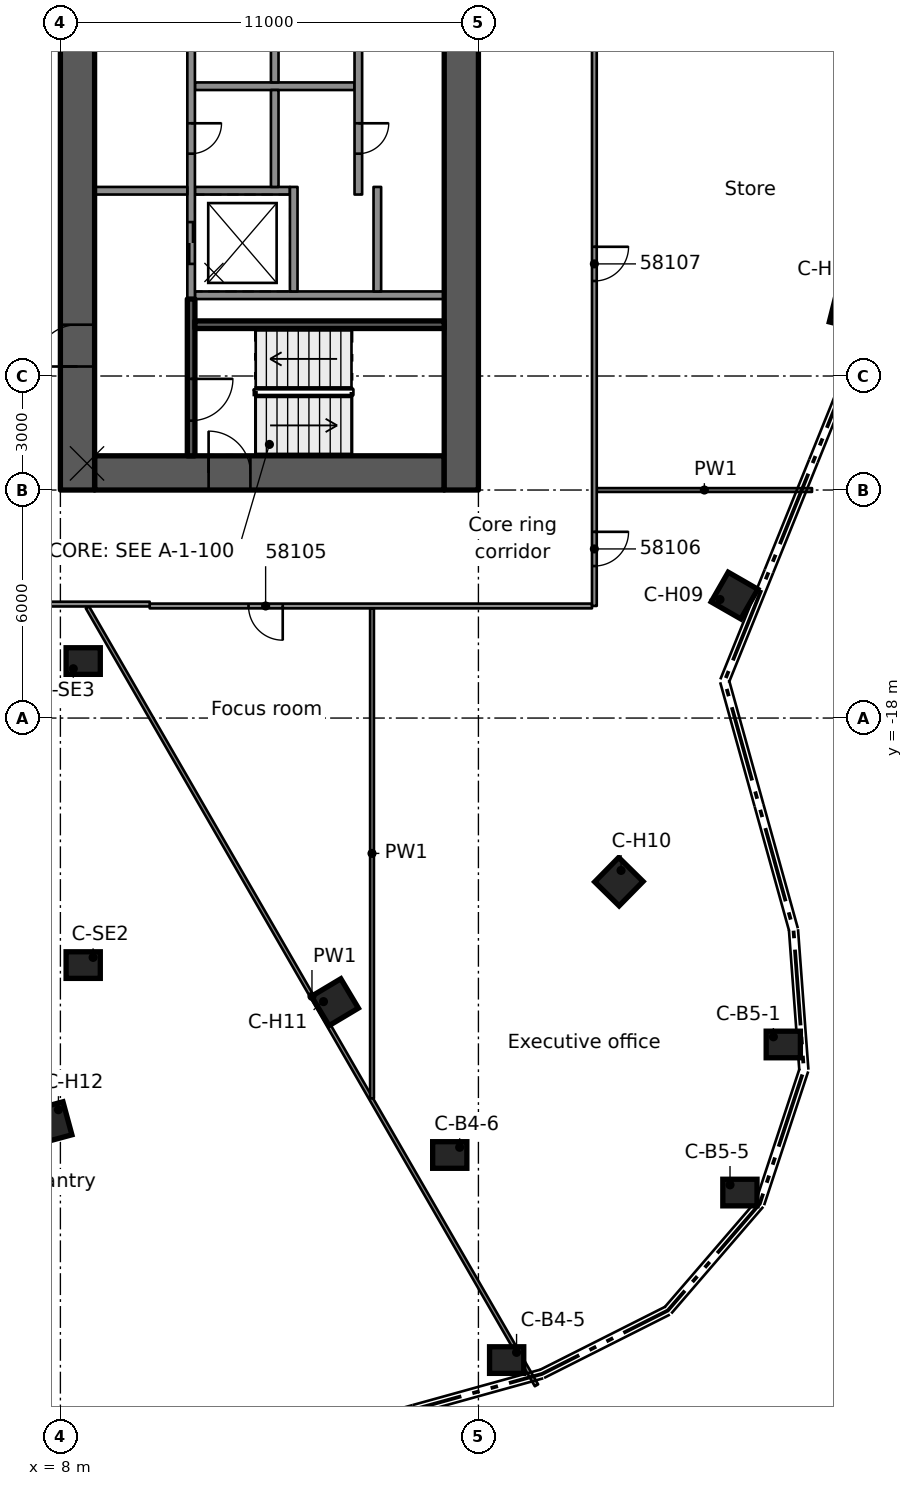
"""IFC4 building model, lengths in metres.
Left out: names, types, materials, properties, quantities, classifications, styles, units other than length and angle.
Written with IfcOpenShell. Run it as: python <this file> out.ifc"""

import sys

from ifc_helpers import new_model, si_unit, direction, frame, frame_2d, origin, origin_2d, place, context, subcontext, project, spatial, rectangle, extrude, element, fill, save


model = new_model("IFC4")
c1 = context("Model", 3, precision=1e-05, world=origin(), true_north=direction((0.0, 1.0)))
c2 = subcontext(c1, "Body", "Model", "MODEL_VIEW")
j1 = project(units=[si_unit("LENGTHUNIT", "METRE"), si_unit("PLANEANGLEUNIT", "RADIAN")], contexts=[c1])
p1 = place(None, origin())
s1 = spatial("IfcSite", under=j1, at=p1, CompositionType="ELEMENT")
p2 = place(p1, origin())
s2 = spatial("IfcBuilding", under=s1, at=p2, CompositionType="ELEMENT")
p3 = place(p2, frame((0.0, 0.0, 285.9)))
s3 = spatial("IfcBuildingStorey", under=s2, at=p3, CompositionType="ELEMENT", Elevation=285.9)
p4 = place(p3, frame((8.9, -11.55, 0.0), z_axis=(0.0, 0.0, 1.0), x_axis=(1.0, 0.0, 0.0)))
e1 = element("IfcWall", 1, at=p4, inside=s3, PredefinedType="SHEAR", context=c2, shape_type="SweptSolid", body=[
    extrude(rectangle(XDim=9.2, YDim=0.9, at=frame_2d((4.6, 0.0))), origin(), (0.0, 0.0, 1.0), 3.5),
])
p5 = place(p4, frame((3.0, 0.0, 0.0)))
e2 = element("IfcOpeningElement", 2, at=p5, cuts=e1, PredefinedType="OPENING", context=c2, shape_type="SweptSolid", body=[
    extrude(rectangle(XDim=1.1, YDim=2.1, at=frame_2d((0.55, 1.05))), frame((0.0, 0.46, 0.0), z_axis=(0.0, -1.0, 0.0), x_axis=(1.0, 0.0, 0.0)), (0.0, 0.0, 1.0), 0.92),
])
p6 = place(p3, frame((8.45, -12.0, 0.0), z_axis=(0.0, 0.0, 1.0), x_axis=(0.0, 1.0, 0.0)))
e3 = element("IfcWall", 3, at=p6, inside=s3, PredefinedType="SHEAR", context=c2, shape_type="SweptSolid", body=[
    extrude(rectangle(XDim=24.0, YDim=0.9, at=frame_2d((12.0, 0.0))), origin(), (0.0, 0.0, 1.0), 3.5),
])
p7 = place(p6, frame((12.6, 0.0, 0.0)))
e4 = element("IfcOpeningElement", 4, at=p7, cuts=e3, PredefinedType="OPENING", context=c2, shape_type="SweptSolid", body=[
    extrude(rectangle(XDim=1.8, YDim=2.1, at=frame_2d((0.9, 1.05))), frame((0.0, 0.46, 0.0), z_axis=(0.0, -1.0, 0.0), x_axis=(1.0, 0.0, 0.0)), (0.0, 0.0, 1.0), 0.92),
])
p8 = place(p6, frame((3.25, 0.0, 0.0)))
e5 = element("IfcOpeningElement", 5, at=p8, cuts=e3, PredefinedType="OPENING", context=c2, shape_type="SweptSolid", body=[
    extrude(rectangle(XDim=1.1, YDim=2.1, at=frame_2d((0.55, 1.05))), frame((0.0, 0.46, 0.0), z_axis=(0.0, -1.0, 0.0), x_axis=(1.0, 0.0, 0.0)), (0.0, 0.0, 1.0), 0.92),
])
p9 = place(p3, frame((18.55, -12.0, 0.0), z_axis=(0.0, 0.0, 1.0), x_axis=(0.0, 1.0, 0.0)))
e6 = element("IfcWall", 6, at=p9, inside=s3, PredefinedType="SHEAR", context=c2, shape_type="SweptSolid", body=[
    extrude(rectangle(XDim=24.0, YDim=0.9, at=frame_2d((12.0, 0.0))), origin(), (0.0, 0.0, 1.0), 3.5),
])
p10 = place(p9, frame((12.1, 0.0, 0.0)))
e7 = element("IfcOpeningElement", 7, at=p10, cuts=e6, PredefinedType="OPENING", context=c2, shape_type="SweptSolid", body=[
    extrude(rectangle(XDim=1.8, YDim=2.1, at=frame_2d((0.9, 1.05))), frame((0.0, 0.46, 0.0), z_axis=(0.0, -1.0, 0.0), x_axis=(1.0, 0.0, 0.0)), (0.0, 0.0, 1.0), 0.92),
])
for number, where, z_axis, x_axis in (
    (8, (19.743, -34.893, 0.0), (0.0, 0.0, 1.0), (1.0, 0.0, 0.0)),
    (9, (18.246, -29.497, 0.0), (0.0, 0.0, 1.0), (1.0, 0.0, 0.0)),
    (10, (27.022, -26.589, 0.0), (0.0, 0.0, 1.0), (1.0, 0.0, 0.0)),
    (11, (25.881, -30.485, 0.0), (0.0, 0.0, 1.0), (1.0, 0.0, 0.0)),
):
    element("IfcColumn", number, at=place(p3, frame(where, z_axis=z_axis, x_axis=x_axis)), inside=s3, PredefinedType="COLUMN", context=c2, shape_type="SweptSolid", body=[
        extrude(rectangle(XDim=0.9, YDim=0.7, at=origin_2d()), origin(), (0.0, 0.0, 1.0), 3.5),
    ])
for number, where, z_axis, x_axis in (
    (12, (28.78, -7.25, 0.0), (0.0, 0.0, 1.0), (0.97, -0.244, 0.0)),
    (13, (25.739, -14.777, 0.0), (0.0, 0.0, 1.0), (0.867, -0.498, 0.0)),
    (14, (22.697, -22.305, 0.0), (0.0, 0.0, 1.0), (0.713, -0.701, 0.0)),
    (15, (15.224, -25.477, 0.0), (0.0, 0.0, 1.0), (0.513, -0.858, 0.0)),
    (16, (7.751, -28.649, 0.0), (0.0, 0.0, 1.0), (0.261, -0.965, 0.0)),
):
    element("IfcColumn", number, at=place(p3, frame(where, z_axis=z_axis, x_axis=x_axis)), inside=s3, PredefinedType="COLUMN", context=c2, shape_type="SweptSolid", body=[
        extrude(rectangle(XDim=0.9, YDim=0.9, at=origin_2d()), origin(), (0.0, 0.0, 1.0), 3.5),
    ])
for number, where, z_axis, x_axis in (
    (17, (8.6, -24.5, 0.0), (0.0, 0.0, 1.0), (1.0, 0.0, 0.0)),
    (18, (8.6, -16.5, 0.0), (0.0, 0.0, 1.0), (1.0, 0.0, 0.0)),
):
    element("IfcColumn", number, at=place(p3, frame(where, z_axis=z_axis, x_axis=x_axis)), inside=s3, PredefinedType="COLUMN", context=c2, shape_type="SweptSolid", body=[
        extrude(rectangle(XDim=0.9, YDim=0.7, at=origin_2d()), origin(), (0.0, 0.0, 1.0), 3.5),
    ])
p11 = place(p3, frame((11.54, -6.875, 0.0), z_axis=(0.0, 0.0, 1.0), x_axis=(1.0, 0.0, 0.0)))
e19 = element("IfcWall", 19, at=p11, inside=s3, PredefinedType="SOLIDWALL", context=c2, shape_type="SweptSolid", body=[
    extrude(rectangle(XDim=6.56, YDim=0.2, at=frame_2d((3.28, 0.0))), origin(), (0.0, 0.0, 1.0), 3.09),
])
p12 = place(p3, frame((11.54, -1.375, 0.0), z_axis=(0.0, 0.0, 1.0), x_axis=(1.0, 0.0, 0.0)))
e20 = element("IfcWall", 20, at=p12, inside=s3, PredefinedType="SOLIDWALL", context=c2, shape_type="SweptSolid", body=[
    extrude(rectangle(XDim=4.2, YDim=0.2, at=frame_2d((2.1, 0.0))), origin(), (0.0, 0.0, 1.0), 3.09),
])
p13 = place(p3, frame((11.54, -4.125, 0.0), z_axis=(0.0, 0.0, 1.0), x_axis=(1.0, 0.0, 0.0)))
e21 = element("IfcWall", 21, at=p13, inside=s3, PredefinedType="SOLIDWALL", context=c2, shape_type="SweptSolid", body=[
    extrude(rectangle(XDim=2.5, YDim=0.2, at=frame_2d((1.25, 0.0))), origin(), (0.0, 0.0, 1.0), 3.09),
])
p14 = place(p3, frame((11.44, 6.975, 0.0), z_axis=(0.0, 0.0, 1.0), x_axis=(0.0, -1.0, 0.0)))
e22 = element("IfcWall", 22, at=p14, inside=s3, PredefinedType="SOLIDWALL", context=c2, shape_type="SweptSolid", body=[
    extrude(rectangle(XDim=13.95, YDim=0.2, at=frame_2d((6.975, 0.0))), origin(), (0.0, 0.0, 1.0), 3.09),
])
p15 = place(p14, frame((0.925, 0.0, 0.0)))
e23 = element("IfcOpeningElement", 23, at=p15, cuts=e22, PredefinedType="OPENING", context=c2, shape_type="SweptSolid", body=[
    extrude(rectangle(XDim=1.1, YDim=2.1, at=frame_2d((0.55, 1.05))), frame((0.0, 0.11, 0.0), z_axis=(0.0, -1.0, 0.0), x_axis=(1.0, 0.0, 0.0)), (0.0, 0.0, 1.0), 0.22),
])
p16 = place(p14, frame((3.675, 0.0, 0.0)))
e24 = element("IfcOpeningElement", 24, at=p16, cuts=e22, PredefinedType="OPENING", context=c2, shape_type="SweptSolid", body=[
    extrude(rectangle(XDim=1.1, YDim=2.1, at=frame_2d((0.55, 1.05))), frame((0.0, 0.11, 0.0), z_axis=(0.0, -1.0, 0.0), x_axis=(1.0, 0.0, 0.0)), (0.0, 0.0, 1.0), 0.22),
])
p17 = place(p14, frame((11.925, 0.0, 0.0)))
e25 = element("IfcOpeningElement", 25, at=p17, cuts=e22, PredefinedType="OPENING", context=c2, shape_type="SweptSolid", body=[
    extrude(rectangle(XDim=1.1, YDim=2.1, at=frame_2d((0.55, 1.05))), frame((0.0, 0.11, 0.0), z_axis=(0.0, -1.0, 0.0), x_axis=(1.0, 0.0, 0.0)), (0.0, 0.0, 1.0), 0.22),
])
p18 = place(p14, frame((6.575, 0.0, 0.0)))
e26 = element("IfcOpeningElement", 26, at=p18, cuts=e22, PredefinedType="OPENING", context=c2, shape_type="SweptSolid", body=[
    extrude(rectangle(XDim=0.8, YDim=2.1, at=frame_2d((0.4, 1.05))), frame((0.0, 0.11, 0.0), z_axis=(0.0, -1.0, 0.0), x_axis=(1.0, 0.0, 0.0)), (0.0, 0.0, 1.0), 0.22),
])
p19 = place(p14, frame((9.325, 0.0, 0.0)))
e27 = element("IfcOpeningElement", 27, at=p19, cuts=e22, PredefinedType="OPENING", context=c2, shape_type="SweptSolid", body=[
    extrude(rectangle(XDim=0.8, YDim=2.1, at=frame_2d((0.4, 1.05))), frame((0.0, 0.11, 0.0), z_axis=(0.0, -1.0, 0.0), x_axis=(1.0, 0.0, 0.0)), (0.0, 0.0, 1.0), 0.22),
])
p20 = place(p3, frame((13.64, 4.025, 0.0), z_axis=(0.0, 0.0, 1.0), x_axis=(0.0, -1.0, 0.0)))
e28 = element("IfcWall", 28, at=p20, inside=s3, PredefinedType="SOLIDWALL", context=c2, shape_type="SweptSolid", body=[
    extrude(rectangle(XDim=5.3, YDim=0.2, at=frame_2d((2.65, 0.0))), origin(), (0.0, 0.0, 1.0), 3.09),
])
p21 = place(p3, frame((13.64, -1.475, 0.0), z_axis=(0.0, 0.0, 1.0), x_axis=(0.0, -1.0, 0.0)))
e29 = element("IfcWall", 29, at=p21, inside=s3, PredefinedType="SOLIDWALL", context=c2, shape_type="SweptSolid", body=[
    extrude(rectangle(XDim=2.55, YDim=0.2, at=frame_2d((1.275, 0.0))), origin(), (0.0, 0.0, 1.0), 3.09),
])
p22 = place(p3, frame((14.14, -4.025, 0.0), z_axis=(0.0, 0.0, 1.0), x_axis=(0.0, -1.0, 0.0)))
e30 = element("IfcWall", 30, at=p22, inside=s3, PredefinedType="SOLIDWALL", context=c2, shape_type="SweptSolid", body=[
    extrude(rectangle(XDim=2.75, YDim=0.2, at=frame_2d((1.375, 0.0))), origin(), (0.0, 0.0, 1.0), 3.09),
])
p23 = place(p3, frame((15.84, 4.025, 0.0), z_axis=(0.0, 0.0, 1.0), x_axis=(0.0, -1.0, 0.0)))
e31 = element("IfcWall", 31, at=p23, inside=s3, PredefinedType="SOLIDWALL", context=c2, shape_type="SweptSolid", body=[
    extrude(rectangle(XDim=8.25, YDim=0.2, at=frame_2d((4.125, 0.0))), origin(), (0.0, 0.0, 1.0), 3.09),
])
p24 = place(p23, frame((0.875, 0.0, 0.0)))
e32 = element("IfcOpeningElement", 32, at=p24, cuts=e31, PredefinedType="OPENING", context=c2, shape_type="SweptSolid", body=[
    extrude(rectangle(XDim=0.8, YDim=2.1, at=frame_2d((0.4, 1.05))), frame((0.0, 0.11, 0.0), z_axis=(0.0, -1.0, 0.0), x_axis=(1.0, 0.0, 0.0)), (0.0, 0.0, 1.0), 0.22),
])
p25 = place(p23, frame((6.375, 0.0, 0.0)))
e33 = element("IfcOpeningElement", 33, at=p25, cuts=e31, PredefinedType="OPENING", context=c2, shape_type="SweptSolid", body=[
    extrude(rectangle(XDim=0.8, YDim=2.1, at=frame_2d((0.4, 1.05))), frame((0.0, 0.11, 0.0), z_axis=(0.0, -1.0, 0.0), x_axis=(1.0, 0.0, 0.0)), (0.0, 0.0, 1.0), 0.22),
])
p26 = place(p3, frame((16.34, -4.025, 0.0), z_axis=(0.0, 0.0, 1.0), x_axis=(0.0, -1.0, 0.0)))
e34 = element("IfcWall", 34, at=p26, inside=s3, PredefinedType="SOLIDWALL", context=c2, shape_type="SweptSolid", body=[
    extrude(rectangle(XDim=2.75, YDim=0.2, at=frame_2d((1.375, 0.0))), origin(), (0.0, 0.0, 1.0), 3.09),
])
p27 = place(p3, frame((11.44, -6.975, 0.0), z_axis=(0.0, 0.0, 1.0), x_axis=(0.0, -1.0, 0.0)))
e35 = element("IfcWall", 35, at=p27, inside=s3, PredefinedType="SOLIDWALL", context=c2, shape_type="SweptSolid", body=[
    extrude(rectangle(XDim=4.125, YDim=0.2, at=frame_2d((2.062, 0.0))), origin(), (0.0, 0.0, 1.0), 3.09),
])
p28 = place(p27, frame((2.1, 0.0, 0.0)))
e36 = element("IfcOpeningElement", 36, at=p28, cuts=e35, PredefinedType="OPENING", context=c2, shape_type="SweptSolid", body=[
    extrude(rectangle(XDim=1.1, YDim=2.1, at=frame_2d((0.55, 1.05))), frame((0.0, 0.11, 0.0), z_axis=(0.0, -1.0, 0.0), x_axis=(1.0, 0.0, 0.0)), (0.0, 0.0, 1.0), 0.22),
])
p29 = place(p3, frame((11.54, -7.65, 0.0), z_axis=(0.0, 0.0, 1.0), x_axis=(1.0, 0.0, 0.0)))
e37 = element("IfcWall", 37, at=p29, inside=s3, PredefinedType="SOLIDWALL", context=c2, shape_type="SweptSolid", body=[
    extrude(rectangle(XDim=6.56, YDim=0.2, at=frame_2d((3.28, 0.0))), origin(), (0.0, 0.0, 1.0), 3.09),
])
p30 = place(p3, frame((8.9, -4.125, 0.0), z_axis=(0.0, 0.0, 1.0), x_axis=(1.0, 0.0, 0.0)))
e38 = element("IfcWall", 38, at=p30, inside=s3, PredefinedType="PARTITIONING", context=c2, shape_type="SweptSolid", body=[
    extrude(rectangle(XDim=2.44, YDim=0.2, at=frame_2d((1.22, 0.0))), origin(), (0.0, 0.0, 1.0), 3.09),
])
p31 = place(p3, frame((8.712, -15.088, 0.0), z_axis=(0.0, 0.0, 1.0), x_axis=(0.499948681642, -0.866055030425, 0.0)))
e39 = element("IfcWall", 39, at=p31, inside=s3, PredefinedType="PARTITIONING", context=c2, shape_type="SweptSolid", body=[
    extrude(rectangle(XDim=23.635, YDim=0.1, at=frame_2d((11.817, 0.0))), origin(), (0.0, 0.0, 1.0), 3.08),
])
p32 = place(p3, frame((21.988, -15.051, 0.0), z_axis=(0.0, 0.0, 1.0), x_axis=(-1.0, 0.0, 0.0)))
e40 = element("IfcWall", 40, at=p32, inside=s3, PredefinedType="PARTITIONING", context=c2, shape_type="SweptSolid", body=[
    extrude(rectangle(XDim=11.638, YDim=0.125, at=frame_2d((5.819, 0.0))), origin(), (0.0, 0.0, 1.0), 3.08),
])
p33 = place(p32, frame((8.137, 0.0, 0.0)))
e41 = element("IfcOpeningElement", 41, at=p33, cuts=e40, PredefinedType="OPENING", context=c2, shape_type="SweptSolid", body=[
    extrude(rectangle(XDim=0.9, YDim=2.1, at=frame_2d((0.45, 1.05))), frame((0.0, 0.073, 0.0), z_axis=(0.0, -1.0, 0.0), x_axis=(1.0, 0.0, 0.0)), (0.0, 0.0, 1.0), 0.145),
])
p34 = place(p3, frame((10.349, -15.001, 0.0), z_axis=(0.0, 0.0, 1.0), x_axis=(-1.0, 0.0, 0.0)))
e42 = element("IfcWall", 42, at=p34, inside=s3, PredefinedType="PARTITIONING", context=c2, shape_type="SweptSolid", body=[
    extrude(rectangle(XDim=21.339, YDim=0.125, at=frame_2d((10.669, 0.0))), origin(), (0.0, 0.0, 1.0), 3.08),
])
p35 = place(p34, frame((14.199, 0.0, 0.0)))
e43 = element("IfcOpeningElement", 43, at=p35, cuts=e42, PredefinedType="OPENING", context=c2, shape_type="SweptSolid", body=[
    extrude(rectangle(XDim=0.9, YDim=2.1, at=frame_2d((0.45, 1.05))), frame((0.0, 0.073, 0.0), z_axis=(0.0, -1.0, 0.0), x_axis=(1.0, 0.0, 0.0)), (0.0, 0.0, 1.0), 0.145),
])
p36 = place(p34, frame((5.538, 0.0, 0.0)))
e44 = element("IfcOpeningElement", 44, at=p36, cuts=e42, PredefinedType="OPENING", context=c2, shape_type="SweptSolid", body=[
    extrude(rectangle(XDim=0.9, YDim=2.1, at=frame_2d((0.45, 1.05))), frame((0.0, 0.073, 0.0), z_axis=(0.0, -1.0, 0.0), x_axis=(1.0, 0.0, 0.0)), (0.0, 0.0, 1.0), 0.145),
])
p37 = place(p3, frame((22.113, -12.0, 0.0), z_axis=(0.0, 0.0, 1.0), x_axis=(1.0, 0.0, 0.0)))
e45 = element("IfcWall", 45, at=p37, inside=s3, PredefinedType="PARTITIONING", context=c2, shape_type="SweptSolid", body=[
    extrude(rectangle(XDim=5.665, YDim=0.1, at=frame_2d((2.833, 0.0))), origin(), (0.0, 0.0, 1.0), 3.08),
])
p38 = place(p3, frame((22.051, 15.05, 0.0), z_axis=(0.0, 0.0, 1.0), x_axis=(0.0, -1.0, 0.0)))
e46 = element("IfcWall", 46, at=p38, inside=s3, PredefinedType="PARTITIONING", context=c2, shape_type="SweptSolid", body=[
    extrude(rectangle(XDim=30.1, YDim=0.125, at=frame_2d((15.05, 0.0))), origin(), (0.0, 0.0, 1.0), 3.08),
])
p39 = place(p38, frame((28.15, 0.0, 0.0)))
e47 = element("IfcOpeningElement", 47, at=p39, cuts=e46, PredefinedType="OPENING", context=c2, shape_type="SweptSolid", body=[
    extrude(rectangle(XDim=0.9, YDim=2.1, at=frame_2d((0.45, 1.05))), frame((0.0, 0.073, 0.0), z_axis=(0.0, -1.0, 0.0), x_axis=(1.0, 0.0, 0.0)), (0.0, 0.0, 1.0), 0.145),
])
p40 = place(p38, frame((20.65, 0.0, 0.0)))
e48 = element("IfcOpeningElement", 48, at=p40, cuts=e46, PredefinedType="OPENING", context=c2, shape_type="SweptSolid", body=[
    extrude(rectangle(XDim=0.9, YDim=2.1, at=frame_2d((0.45, 1.05))), frame((0.0, 0.073, 0.0), z_axis=(0.0, -1.0, 0.0), x_axis=(1.0, 0.0, 0.0)), (0.0, 0.0, 1.0), 0.145),
])
p41 = place(p38, frame((11.4, 0.0, 0.0)))
e49 = element("IfcOpeningElement", 49, at=p41, cuts=e46, PredefinedType="OPENING", context=c2, shape_type="SweptSolid", body=[
    extrude(rectangle(XDim=1.1, YDim=2.1, at=frame_2d((0.55, 1.05))), frame((0.0, 0.073, 0.0), z_axis=(0.0, -1.0, 0.0), x_axis=(1.0, 0.0, 0.0)), (0.0, 0.0, 1.0), 0.145),
])
p42 = place(p38, frame((5.15, 0.0, 0.0)))
e50 = element("IfcOpeningElement", 50, at=p42, cuts=e46, PredefinedType="OPENING", context=c2, shape_type="SweptSolid", body=[
    extrude(rectangle(XDim=1.8, YDim=2.1, at=frame_2d((0.9, 1.05))), frame((0.0, 0.073, 0.0), z_axis=(0.0, -1.0, 0.0), x_axis=(1.0, 0.0, 0.0)), (0.0, 0.0, 1.0), 0.145),
])
p43 = place(p3, frame((16.2, -28.009, 0.0), z_axis=(0.0, 0.0, 1.0), x_axis=(0.0, 1.0, 0.0)))
e51 = element("IfcWall", 51, at=p43, inside=s3, PredefinedType="PARTITIONING", context=c2, shape_type="SweptSolid", body=[
    extrude(rectangle(XDim=12.895, YDim=0.1, at=frame_2d((6.448, 0.0))), origin(), (0.0, 0.0, 1.0), 3.08),
])
p44 = place(p17, origin())
e52 = element("IfcDoor", 52, at=p44, inside=s3, OperationType="DOUBLE_DOOR_SLIDING", PredefinedType="DOOR", context=c2, shape_type="SweptSolid", body=[
    extrude(rectangle(XDim=1.1, YDim=2.1, at=frame_2d((0.55, 1.05))), frame((0.0, 0.025, 0.0), z_axis=(0.0, -1.0, 0.0), x_axis=(1.0, 0.0, 0.0)), (0.0, 0.0, 1.0), 0.05),
])
fill(e25, e52)
p45 = place(p19, origin())
e53 = element("IfcDoor", 53, at=p45, inside=s3, OperationType="SINGLE_SWING_LEFT", PredefinedType="DOOR", context=c2, shape_type="SweptSolid", body=[
    extrude(rectangle(XDim=0.8, YDim=2.1, at=frame_2d((0.4, 1.05))), frame((0.0, 0.025, 0.0), z_axis=(0.0, -1.0, 0.0), x_axis=(1.0, 0.0, 0.0)), (0.0, 0.0, 1.0), 0.05),
])
fill(e27, e53)
p46 = place(p25, origin())
e54 = element("IfcDoor", 54, at=p46, inside=s3, OperationType="SINGLE_SWING_LEFT", PredefinedType="DOOR", context=c2, shape_type="SweptSolid", body=[
    extrude(rectangle(XDim=0.8, YDim=2.1, at=frame_2d((0.4, 1.05))), frame((0.0, 0.025, 0.0), z_axis=(0.0, -1.0, 0.0), x_axis=(1.0, 0.0, 0.0)), (0.0, 0.0, 1.0), 0.05),
])
fill(e33, e54)
p47 = place(p8, origin())
e55 = element("IfcDoor", 55, at=p47, inside=s3, OperationType="SINGLE_SWING_LEFT", PredefinedType="DOOR", context=c2, shape_type="SweptSolid", body=[
    extrude(rectangle(XDim=1.1, YDim=2.1, at=frame_2d((0.55, 1.05))), frame((0.0, 0.025, 0.0), z_axis=(0.0, -1.0, 0.0), x_axis=(1.0, 0.0, 0.0)), (0.0, 0.0, 1.0), 0.05),
])
fill(e5, e55)
p48 = place(p5, origin())
e56 = element("IfcDoor", 56, at=p48, inside=s3, OperationType="SINGLE_SWING_LEFT", PredefinedType="DOOR", context=c2, shape_type="SweptSolid", body=[
    extrude(rectangle(XDim=1.1, YDim=2.1, at=frame_2d((0.55, 1.05))), frame((0.0, 0.025, 0.0), z_axis=(0.0, -1.0, 0.0), x_axis=(1.0, 0.0, 0.0)), (0.0, 0.0, 1.0), 0.05),
])
fill(e2, e56)
p49 = place(p28, origin())
e57 = element("IfcDoor", 57, at=p49, inside=s3, OperationType="SINGLE_SWING_RIGHT", PredefinedType="DOOR", context=c2, shape_type="SweptSolid", body=[
    extrude(rectangle(XDim=1.1, YDim=2.1, at=frame_2d((0.55, 1.05))), frame((0.0, 0.025, 0.0), z_axis=(0.0, -1.0, 0.0), x_axis=(1.0, 0.0, 0.0)), (0.0, 0.0, 1.0), 0.05),
])
fill(e36, e57)
p50 = place(p33, origin())
e58 = element("IfcDoor", 58, at=p50, inside=s3, OperationType="SINGLE_SWING_RIGHT", PredefinedType="DOOR", context=c2, shape_type="SweptSolid", body=[
    extrude(rectangle(XDim=0.9, YDim=2.1, at=frame_2d((0.45, 1.05))), frame((0.0, 0.025, 0.0), z_axis=(0.0, -1.0, 0.0), x_axis=(1.0, 0.0, 0.0)), (0.0, 0.0, 1.0), 0.05),
])
fill(e41, e58)
p51 = place(p39, origin())
e59 = element("IfcDoor", 59, at=p51, inside=s3, OperationType="SINGLE_SWING_RIGHT", PredefinedType="DOOR", context=c2, shape_type="SweptSolid", body=[
    extrude(rectangle(XDim=0.9, YDim=2.1, at=frame_2d((0.45, 1.05))), frame((0.0, 0.025, 0.0), z_axis=(0.0, -1.0, 0.0), x_axis=(1.0, 0.0, 0.0)), (0.0, 0.0, 1.0), 0.05),
])
fill(e47, e59)
p52 = place(p40, origin())
e60 = element("IfcDoor", 60, at=p52, inside=s3, OperationType="SINGLE_SWING_RIGHT", PredefinedType="DOOR", context=c2, shape_type="SweptSolid", body=[
    extrude(rectangle(XDim=0.9, YDim=2.1, at=frame_2d((0.45, 1.05))), frame((0.0, 0.025, 0.0), z_axis=(0.0, -1.0, 0.0), x_axis=(1.0, 0.0, 0.0)), (0.0, 0.0, 1.0), 0.05),
])
fill(e48, e60)
save(model, sys.argv[1])
